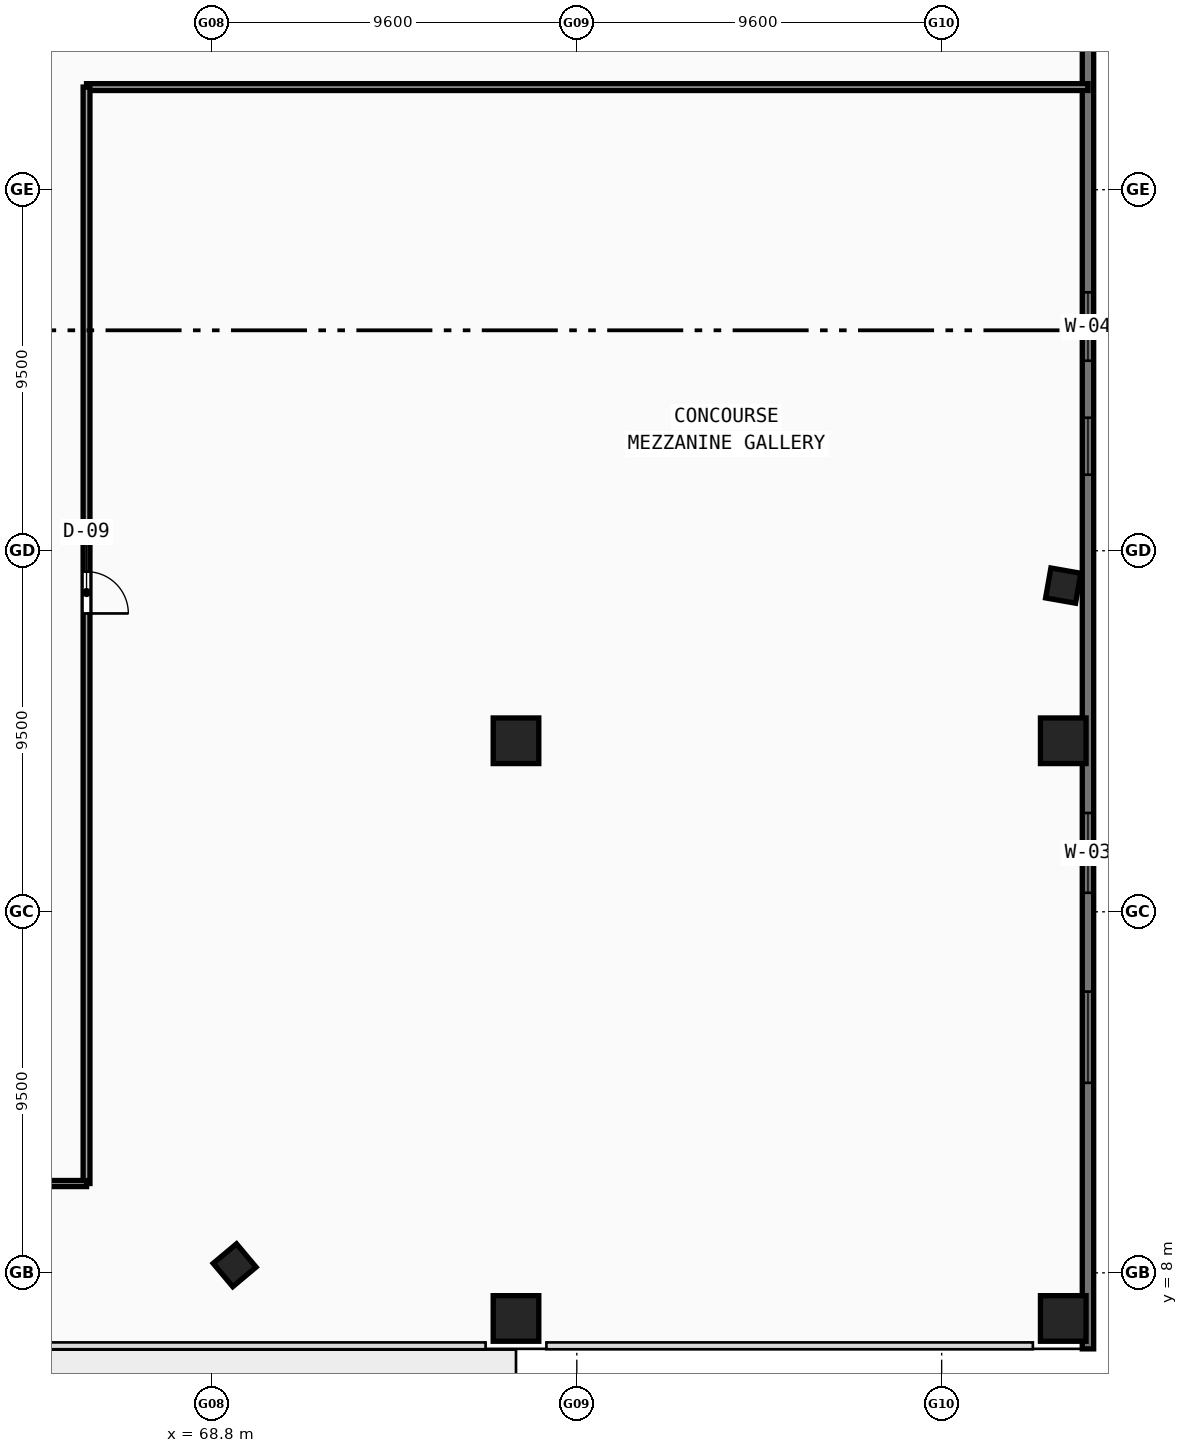
"""IFC4 building model, lengths in metres.
Left out: names, types, materials, properties, quantities, classifications, styles, units other than length and angle.
Written with IfcOpenShell. Run it as: python <this file> out.ifc"""

import sys

from ifc_helpers import new_model, si_unit, direction, frame, frame_2d, origin, origin_with_axes, origin_2d, place, context, subcontext, project, spatial, rectangle, hollow_rectangle, extrude, source, transform, mapped, element, fill, save


model = new_model("IFC4")
c1 = context("Model", 3, precision=1e-05, world=origin(), true_north=direction((0.0, 1.0)))
c2 = subcontext(c1, "Body", "Model", "MODEL_VIEW")
j1 = project(units=[si_unit("LENGTHUNIT", "METRE"), si_unit("PLANEANGLEUNIT", "RADIAN")], contexts=[c1])
p1 = place(None, origin())
s1 = spatial("IfcSite", under=j1, at=p1, CompositionType="ELEMENT")
p2 = place(p1, origin())
s2 = spatial("IfcBuilding", under=s1, at=p2, CompositionType="ELEMENT")
p3 = place(p2, frame((0.0, 0.0, 4.8)))
s3 = spatial("IfcBuildingStorey", under=s2, at=p3, CompositionType="ELEMENT", Elevation=4.8)
m1 = source(origin(), c2, "Body", "SweptSolid", [
    extrude(hollow_rectangle(XDim=1.2, YDim=1.2, WallThickness=0.05, at=origin_2d()), origin(), (0.0, 0.0, 1.0), 4.8),
])
for number, where, z_axis, x_axis in (
    (1, (76.8, 6.8, -0.28), (0.0, 0.0, 1.0), (1.0, 0.0, 0.0)),
    (2, (76.8, 22.0, -0.28), (0.0, 0.0, 1.0), (1.0, 0.0, 0.0)),
    (3, (91.2, 6.8, -0.28), (0.0, 0.0, 1.0), (1.0, 0.0, 0.0)),
    (4, (91.2, 22.0, -0.28), (0.0, 0.0, 1.0), (1.0, 0.0, 0.0)),
):
    element("IfcColumn", number, at=place(p3, frame(where, z_axis=z_axis, x_axis=x_axis)), inside=s3, PredefinedType="COLUMN", context=c2, shape_type="MappedRepresentation", body=[
        mapped(m1, transform((0.0, 0.0, 0.0), scale=1.0)),
    ])
m2 = source(origin(), c2, "Body", "SweptSolid", [
    extrude(hollow_rectangle(XDim=0.8, YDim=0.8, WallThickness=0.032, at=origin_2d()), origin(), (0.0, 0.0, 1.0), 4.8),
])
for number, where, z_axis, x_axis in (
    (5, (69.397, 8.2, -0.28), (0.0, 0.0, 1.0), (0.766, 0.643, 0.0)),
    (6, (91.199, 26.083, -0.28), (0.0, 0.0, 1.0), (0.174, 0.985, 0.0)),
):
    element("IfcColumn", number, at=place(p3, frame(where, z_axis=z_axis, x_axis=x_axis)), inside=s3, PredefinedType="COLUMN", context=c2, shape_type="MappedRepresentation", body=[
        mapped(m2, transform((0.0, 0.0, 0.0), scale=1.0)),
    ])
p4 = place(p3, frame((91.85, 6.0, 0.0), z_axis=(0.0, 0.0, 1.0), x_axis=(0.0, 1.0, 0.0)))
e7 = element("IfcWall", 7, at=p4, inside=s3, PredefinedType="STANDARD", context=c2, shape_type="SweptSolid", body=[
    extrude(rectangle(XDim=84.0, YDim=0.3, at=frame_2d((42.0, 0.0))), origin(), (0.0, 0.0, 1.0), 4.52),
])
p5 = place(p4, frame((7.0, 0.0, 0.9)))
e8 = element("IfcOpeningElement", 8, at=p5, cuts=e7, PredefinedType="OPENING", context=c2, shape_type="SweptSolid", body=[
    extrude(rectangle(XDim=2.4, YDim=1.8, at=frame_2d((1.2, 0.9))), frame((0.0, 0.16, 0.0), z_axis=(0.0, -1.0, 0.0), x_axis=(1.0, 0.0, 0.0)), (0.0, 0.0, 1.0), 0.32),
])
p6 = place(p4, frame((23.0, 0.0, 0.9)))
e9 = element("IfcOpeningElement", 9, at=p6, cuts=e7, PredefinedType="OPENING", context=c2, shape_type="SweptSolid", body=[
    extrude(rectangle(XDim=1.5, YDim=1.6, at=frame_2d((0.75, 0.8))), frame((0.0, 0.16, 0.0), z_axis=(0.0, -1.0, 0.0), x_axis=(1.0, 0.0, 0.0)), (0.0, 0.0, 1.0), 0.32),
])
p7 = place(p4, frame((43.0, 0.0, 0.9)))
e10 = element("IfcOpeningElement", 10, at=p7, cuts=e7, PredefinedType="OPENING", context=c2, shape_type="SweptSolid", body=[
    extrude(rectangle(XDim=2.4, YDim=1.8, at=frame_2d((1.2, 0.9))), frame((0.0, 0.16, 0.0), z_axis=(0.0, -1.0, 0.0), x_axis=(1.0, 0.0, 0.0)), (0.0, 0.0, 1.0), 0.32),
])
p8 = place(p4, frame((63.0, 0.0, 0.9)))
e11 = element("IfcOpeningElement", 11, at=p8, cuts=e7, PredefinedType="OPENING", context=c2, shape_type="SweptSolid", body=[
    extrude(rectangle(XDim=1.5, YDim=1.6, at=frame_2d((0.75, 0.8))), frame((0.0, 0.16, 0.0), z_axis=(0.0, -1.0, 0.0), x_axis=(1.0, 0.0, 0.0)), (0.0, 0.0, 1.0), 0.32),
])
p9 = place(p4, frame((12.0, 0.0, 0.95)))
e12 = element("IfcOpeningElement", 12, at=p9, cuts=e7, PredefinedType="OPENING", context=c2, shape_type="SweptSolid", body=[
    extrude(rectangle(XDim=2.1, YDim=1.75, at=frame_2d((1.05, 0.875))), frame((0.0, 0.16, 0.0), z_axis=(0.0, -1.0, 0.0), x_axis=(1.0, 0.0, 0.0)), (0.0, 0.0, 1.0), 0.32),
])
p10 = place(p4, frame((26.0, 0.0, 0.95)))
e13 = element("IfcOpeningElement", 13, at=p10, cuts=e7, PredefinedType="OPENING", context=c2, shape_type="SweptSolid", body=[
    extrude(rectangle(XDim=1.8, YDim=1.7, at=frame_2d((0.9, 0.85))), frame((0.0, 0.16, 0.0), z_axis=(0.0, -1.0, 0.0), x_axis=(1.0, 0.0, 0.0)), (0.0, 0.0, 1.0), 0.32),
])
p11 = place(p3, frame((65.5, 39.2, 0.0), z_axis=(0.0, 0.0, 1.0), x_axis=(1.0, 0.0, 0.0)))
e14 = element("IfcWall", 14, at=p11, inside=s3, PredefinedType="PARTITIONING", context=c2, shape_type="SweptSolid", body=[
    extrude(rectangle(XDim=26.35, YDim=0.18, at=frame_2d((13.175, 0.0))), origin(), (0.0, 0.0, 1.0), 3.62),
])
p12 = place(p3, frame((65.5, 10.35, 0.0), z_axis=(0.0, 0.0, 1.0), x_axis=(0.0, 1.0, 0.0)))
e15 = element("IfcWall", 15, at=p12, inside=s3, PredefinedType="PARTITIONING", context=c2, shape_type="SweptSolid", body=[
    extrude(rectangle(XDim=28.85, YDim=0.18, at=frame_2d((14.425, 0.0))), origin(), (0.0, 0.0, 1.0), 3.62),
])
p13 = place(p12, frame((15.0, 0.0, 0.0)))
e16 = element("IfcOpeningElement", 16, at=p13, cuts=e15, PredefinedType="OPENING", context=c2, shape_type="SweptSolid", body=[
    extrude(rectangle(XDim=1.1, YDim=2.15, at=frame_2d((0.55, 1.075))), frame((0.0, 0.1, 0.0), z_axis=(0.0, -1.0, 0.0), x_axis=(1.0, 0.0, 0.0)), (0.0, 0.0, 1.0), 0.2),
])
p14 = place(p3, frame((30.5, 10.35, 0.0), z_axis=(0.0, 0.0, 1.0), x_axis=(1.0, 0.0, 0.0)))
e17 = element("IfcWall", 17, at=p14, inside=s3, PredefinedType="PARTITIONING", context=c2, shape_type="SweptSolid", body=[
    extrude(rectangle(XDim=35.0, YDim=0.16, at=frame_2d((17.5, 0.0))), origin(), (0.0, 0.0, 1.0), 3.62),
])
m3 = source(origin(), c2, "Body", "SweptSolid", [
    extrude(rectangle(XDim=2.4, YDim=1.8, at=frame_2d((1.2, 0.9))), frame((0.0, 0.03, 0.0), z_axis=(0.0, -1.0, 0.0), x_axis=(1.0, 0.0, 0.0)), (0.0, 0.0, 1.0), 0.06),
])
p15 = place(p5, origin_with_axes())
e18 = element("IfcWindow", 18, at=p15, inside=s3, PartitioningType="SINGLE_PANEL", PredefinedType="WINDOW", context=c2, shape_type="MappedRepresentation", body=[
    mapped(m3, transform((0.0, 0.0, 0.0), scale=1.0)),
])
fill(e8, e18)
m4 = source(origin(), c2, "Body", "SweptSolid", [
    extrude(rectangle(XDim=1.5, YDim=1.6, at=frame_2d((0.75, 0.8))), frame((0.0, 0.03, 0.0), z_axis=(0.0, -1.0, 0.0), x_axis=(1.0, 0.0, 0.0)), (0.0, 0.0, 1.0), 0.06),
])
p16 = place(p6, origin_with_axes())
e19 = element("IfcWindow", 19, at=p16, inside=s3, PartitioningType="SINGLE_PANEL", PredefinedType="WINDOW", context=c2, shape_type="MappedRepresentation", body=[
    mapped(m4, transform((0.0, 0.0, 0.0), scale=1.0)),
])
fill(e9, e19)
m5 = source(origin(), c2, "Body", "SweptSolid", [
    extrude(rectangle(XDim=1.1, YDim=2.15, at=frame_2d((0.55, 1.075))), frame((0.0, 0.025, 0.0), z_axis=(0.0, -1.0, 0.0), x_axis=(1.0, 0.0, 0.0)), (0.0, 0.0, 1.0), 0.05),
])
p17 = place(p13, frame((1.1, 0.0, 0.0), z_axis=(0.0, 0.0, 1.0), x_axis=(-1.0, 0.0, 0.0)))
e20 = element("IfcDoor", 20, at=p17, inside=s3, OperationType="SINGLE_SWING_RIGHT", PredefinedType="DOOR", context=c2, shape_type="MappedRepresentation", body=[
    mapped(m5, transform((0.0, 0.0, 0.0), scale=1.0)),
])
fill(e16, e20)
m6 = source(origin(), c2, "Body", "SweptSolid", [
    extrude(rectangle(XDim=2.1, YDim=1.75, at=frame_2d((1.05, 0.875))), frame((0.0, 0.03, 0.0), z_axis=(0.0, -1.0, 0.0), x_axis=(1.0, 0.0, 0.0)), (0.0, 0.0, 1.0), 0.06),
])
p18 = place(p9, origin_with_axes())
e21 = element("IfcWindow", 21, at=p18, inside=s3, PartitioningType="SINGLE_PANEL", PredefinedType="WINDOW", context=c2, shape_type="MappedRepresentation", body=[
    mapped(m6, transform((0.0, 0.0, 0.0), scale=1.0)),
])
fill(e12, e21)
m7 = source(origin(), c2, "Body", "SweptSolid", [
    extrude(rectangle(XDim=1.8, YDim=1.7, at=frame_2d((0.9, 0.85))), frame((0.0, 0.03, 0.0), z_axis=(0.0, -1.0, 0.0), x_axis=(1.0, 0.0, 0.0)), (0.0, 0.0, 1.0), 0.06),
])
p19 = place(p10, origin_with_axes())
e22 = element("IfcWindow", 22, at=p19, inside=s3, PartitioningType="SINGLE_PANEL", PredefinedType="WINDOW", context=c2, shape_type="MappedRepresentation", body=[
    mapped(m7, transform((0.0, 0.0, 0.0), scale=1.0)),
])
fill(e13, e22)
save(model, sys.argv[1])
